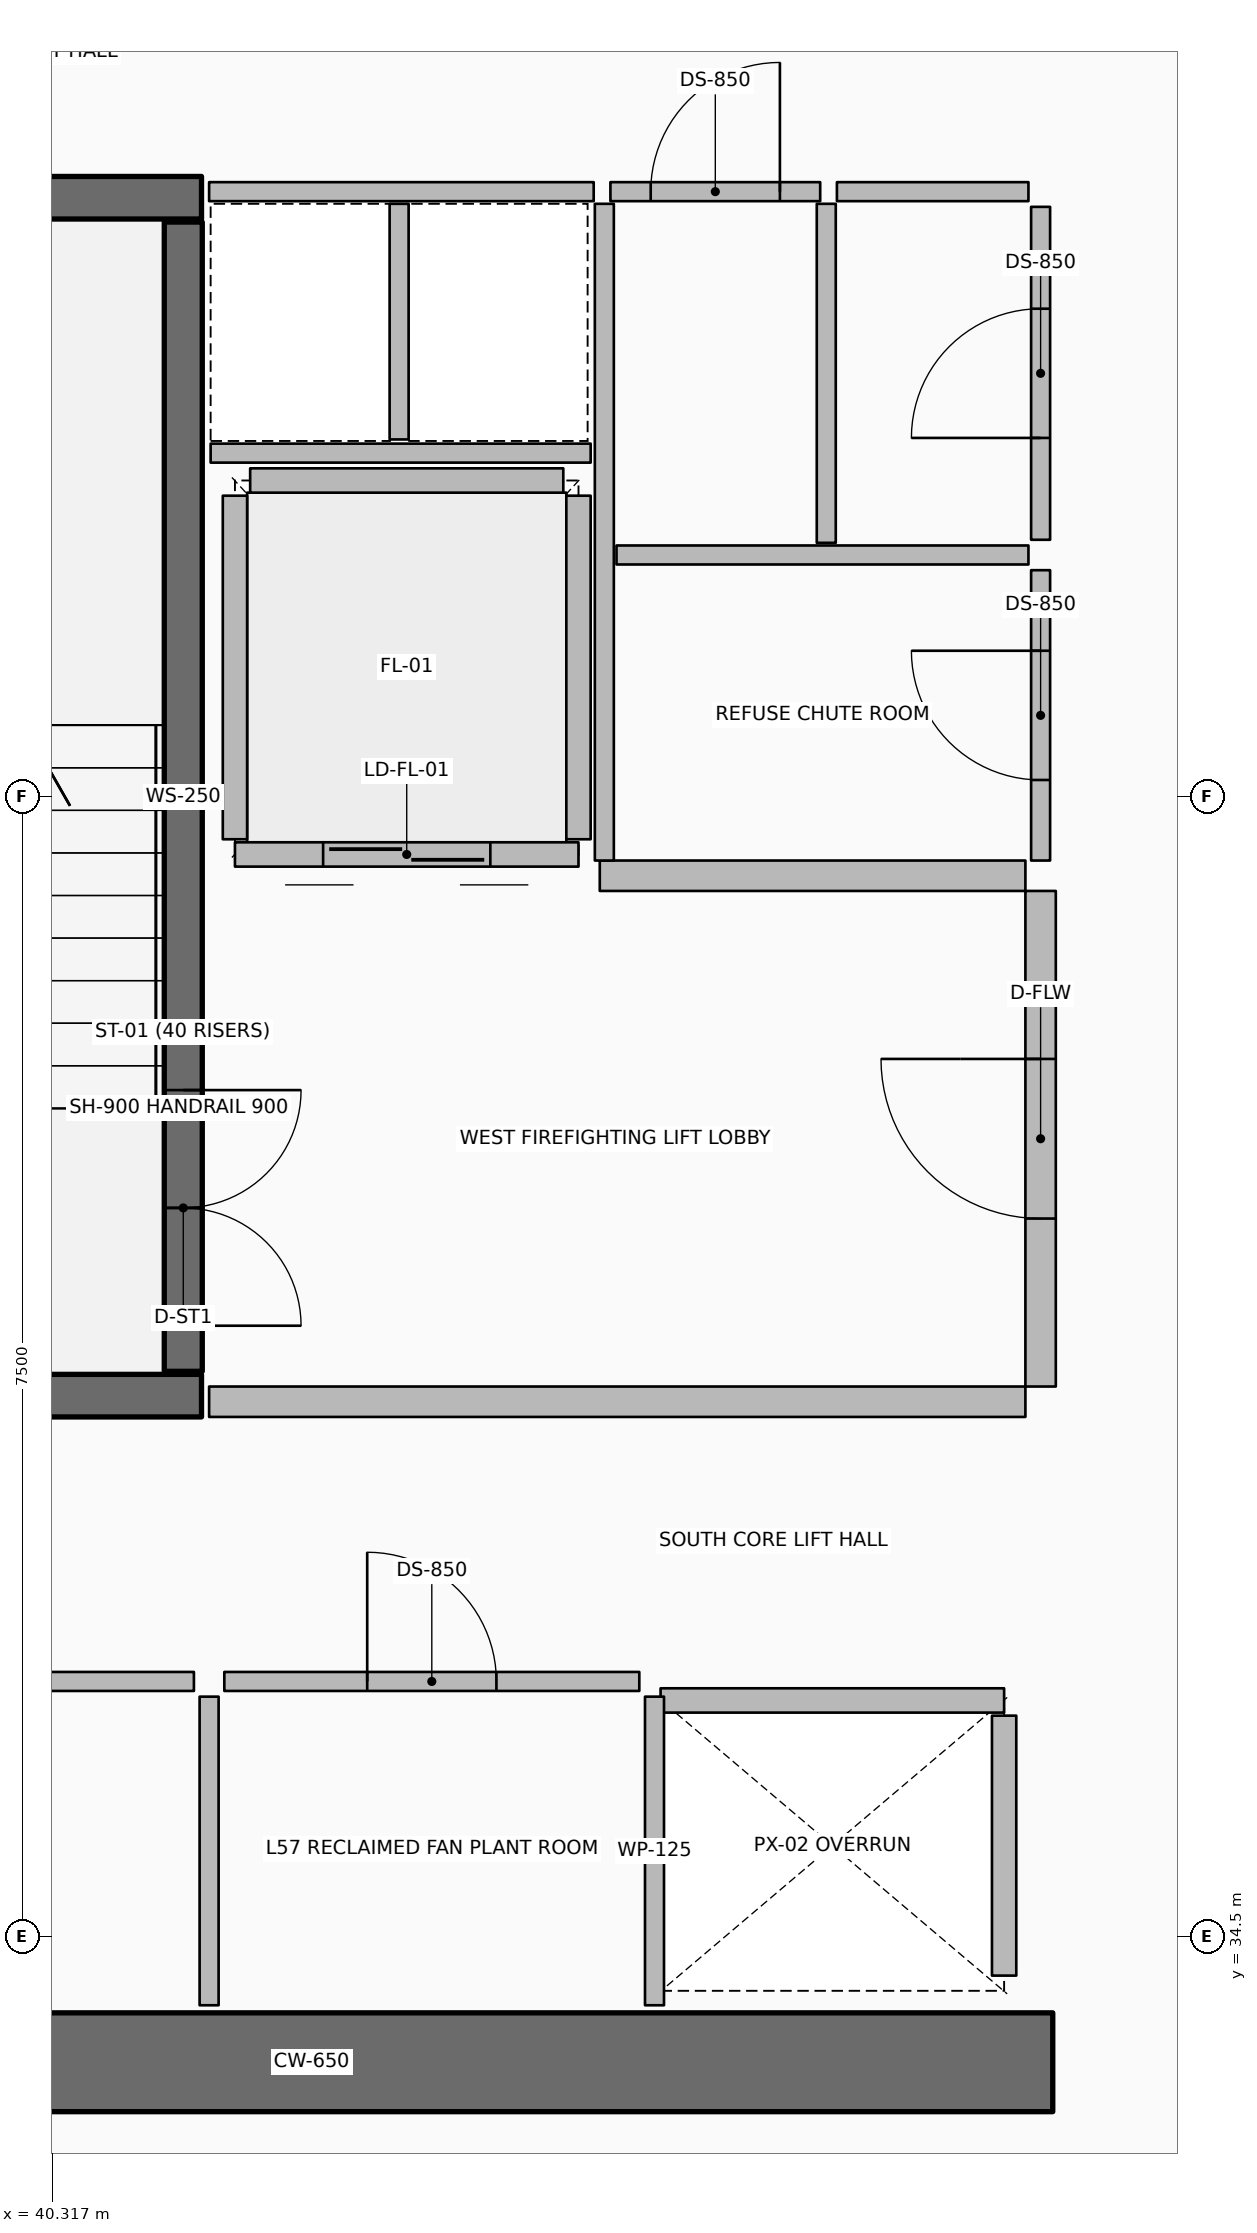
"""IFC4 building model, lengths in metres.
Left out: names, types, materials, properties, quantities, classifications, styles, units other than length and angle.
Written with IfcOpenShell. Run it as: python <this file> out.ifc"""

import sys

from ifc_helpers import new_model, si_unit, direction, frame, frame_2d, origin, origin_2d, place, context, subcontext, project, spatial, rectangle, hollow_rectangle, extrude, element, fill, save


model = new_model("IFC4")
c1 = context("Model", 3, precision=1e-05, world=origin(), true_north=direction((0.0, 1.0)))
c2 = subcontext(c1, "Body", "Model", "MODEL_VIEW")
j1 = project(units=[si_unit("LENGTHUNIT", "METRE"), si_unit("PLANEANGLEUNIT", "RADIAN")], contexts=[c1])
p1 = place(None, origin())
s1 = spatial("IfcSite", under=j1, at=p1, CompositionType="ELEMENT")
p2 = place(p1, origin())
s2 = spatial("IfcBuilding", under=s1, at=p2, CompositionType="ELEMENT")
p3 = place(p2, frame((0.0, 0.0, 225.3)))
s3 = spatial("IfcBuildingStorey", under=s2, at=p3, CompositionType="ELEMENT", Elevation=225.3)
p4 = place(p3, frame((37.15, 33.675, 0.0), z_axis=(0.0, 0.0, 1.0), x_axis=(1.0, 0.0, 0.0)))
e1 = element("IfcWall", 1, at=p4, inside=s3, PredefinedType="SHEAR", context=c2, shape_type="SweptSolid", body=[
    extrude(rectangle(XDim=9.75, YDim=0.65, at=frame_2d((4.875, 0.0))), origin(), (0.0, 0.0, 1.0), 6.6),
])
for number, where, z_axis, x_axis in (
    (2, (37.8, 38.06, 0.0), (0.0, 0.0, 1.0), (1.0, 0.0, 0.0)),
    (3, (37.8, 45.94, 0.0), (0.0, 0.0, 1.0), (1.0, 0.0, 0.0)),
):
    element("IfcWall", number, at=place(p3, frame(where, z_axis=z_axis, x_axis=x_axis)), inside=s3, PredefinedType="SHEAR", context=c2, shape_type="SweptSolid", body=[
        extrude(rectangle(XDim=3.5, YDim=0.28, at=frame_2d((1.75, 0.0))), origin(), (0.0, 0.0, 1.0), 6.6),
    ])
p5 = place(p3, frame((41.18, 42.47, 0.0), z_axis=(0.0, 0.0, 1.0), x_axis=(1.0, 0.0, 0.0)))
e4 = element("IfcColumn", 4, at=p5, inside=s3, PredefinedType="COLUMN", context=c2, shape_type="SweptSolid", body=[
    extrude(hollow_rectangle(XDim=0.2, YDim=0.2, WallThickness=0.01, InnerFilletRadius=0.01, OuterFilletRadius=0.02, at=origin_2d()), origin(), (0.0, 0.0, 1.0), 1.445),
])
p6 = place(p3, frame((41.18, 43.17, 0.0), z_axis=(0.0, 0.0, 1.0), x_axis=(1.0, 0.0, 0.0)))
e5 = element("IfcColumn", 5, at=p6, inside=s3, PredefinedType="COLUMN", context=c2, shape_type="SweptSolid", body=[
    extrude(hollow_rectangle(XDim=0.2, YDim=0.2, WallThickness=0.01, InnerFilletRadius=0.01, OuterFilletRadius=0.02, at=origin_2d()), origin(), (0.0, 0.0, 1.0), 4.745),
])
p7 = place(p3, frame((41.18, 38.22, 0.0), z_axis=(0.0, 0.0, 1.0), x_axis=(0.0, 1.0, 0.0)))
e6 = element("IfcWall", 6, at=p7, inside=s3, PredefinedType="SOLIDWALL", context=c2, shape_type="SweptSolid", body=[
    extrude(rectangle(XDim=7.56, YDim=0.25, at=frame_2d((3.78, 0.0))), origin(), (0.0, 0.0, 1.0), 6.28),
])
p8 = place(p7, frame((0.3, 0.0, 0.0)))
e7 = element("IfcOpeningElement", 7, at=p8, cuts=e6, PredefinedType="OPENING", context=c2, shape_type="SweptSolid", body=[
    extrude(rectangle(XDim=1.55, YDim=2.15, at=frame_2d((0.775, 1.075))), frame((0.0, 0.135, 0.0), z_axis=(0.0, -1.0, 0.0), x_axis=(1.0, 0.0, 0.0)), (0.0, 0.0, 1.0), 0.27),
])
p9 = place(p3, frame((44.32, 36.055, 0.0), z_axis=(0.0, 0.0, 1.0), x_axis=(1.0, 0.0, 0.0)))
e8 = element("IfcWall", 8, at=p9, inside=s3, PredefinedType="PARTITIONING", context=c2, shape_type="SweptSolid", body=[
    extrude(rectangle(XDim=2.26, YDim=0.16, at=frame_2d((1.13, 0.0))), origin(), (0.0, 0.0, 1.0), 6.28),
])
p10 = place(p3, frame((46.58, 34.245, 0.0), z_axis=(0.0, 0.0, 1.0), x_axis=(0.0, 1.0, 0.0)))
e9 = element("IfcWall", 9, at=p10, inside=s3, PredefinedType="PARTITIONING", context=c2, shape_type="SweptSolid", body=[
    extrude(rectangle(XDim=1.71, YDim=0.16, at=frame_2d((0.855, 0.0))), origin(), (0.0, 0.0, 1.0), 6.28),
])
p11 = place(p3, frame((43.78, 41.62, 0.0), z_axis=(0.0, 0.0, 1.0), x_axis=(-1.0, 0.0, 0.0)))
e10 = element("IfcWall", 10, at=p11, inside=s3, PredefinedType="PARTITIONING", context=c2, shape_type="SweptSolid", body=[
    extrude(rectangle(XDim=2.26, YDim=0.16, at=frame_2d((1.13, 0.0))), origin(), (0.0, 0.0, 1.0), 6.28),
])
p12 = place(p11, frame((0.58, 0.0, 0.0)))
e11 = element("IfcOpeningElement", 11, at=p12, cuts=e10, PredefinedType="OPENING", context=c2, shape_type="SweptSolid", body=[
    extrude(rectangle(XDim=1.1, YDim=2.1, at=frame_2d((0.55, 1.05))), frame((0.0, 0.09, 0.0), z_axis=(0.0, -1.0, 0.0), x_axis=(1.0, 0.0, 0.0)), (0.0, 0.0, 1.0), 0.18),
])
for number, where, z_axis, x_axis in (
    (12, (43.78, 41.72, 0.0), (0.0, 0.0, 1.0), (0.0, 1.0, 0.0)),
    (13, (41.52, 41.72, 0.0), (0.0, 0.0, 1.0), (0.0, 1.0, 0.0)),
):
    element("IfcWall", number, at=place(p3, frame(where, z_axis=z_axis, x_axis=x_axis)), inside=s3, PredefinedType="PARTITIONING", context=c2, shape_type="SweptSolid", body=[
        extrude(rectangle(XDim=2.26, YDim=0.16, at=frame_2d((1.13, 0.0))), origin(), (0.0, 0.0, 1.0), 6.28),
    ])
p13 = place(p3, frame((41.62, 44.08, 0.0), z_axis=(0.0, 0.0, 1.0), x_axis=(1.0, 0.0, 0.0)))
e14 = element("IfcWall", 14, at=p13, inside=s3, PredefinedType="PARTITIONING", context=c2, shape_type="SweptSolid", body=[
    extrude(rectangle(XDim=2.06, YDim=0.16, at=frame_2d((1.03, 0.0))), origin(), (0.0, 0.0, 1.0), 6.28),
])
for number, where, z_axis, x_axis in (
    (15, (44.28, 34.05, 0.0), (0.0, 0.0, 1.0), (0.0, 1.0, 0.0)),
    (16, (41.35, 34.05, 0.0), (0.0, 0.0, 1.0), (0.0, 1.0, 0.0)),
):
    element("IfcWall", number, at=place(p3, frame(where, z_axis=z_axis, x_axis=x_axis)), inside=s3, PredefinedType="PARTITIONING", context=c2, shape_type="SweptSolid", body=[
        extrude(rectangle(XDim=2.03, YDim=0.125, at=frame_2d((1.015, 0.0))), origin(), (0.0, 0.0, 1.0), 5.72),
    ])
p14 = place(p3, frame((37.92, 36.18, 0.0), z_axis=(0.0, 0.0, 1.0), x_axis=(1.0, 0.0, 0.0)))
e17 = element("IfcWall", 17, at=p14, inside=s3, PredefinedType="PARTITIONING", context=c2, shape_type="SweptSolid", body=[
    extrude(rectangle(XDim=3.33, YDim=0.125, at=frame_2d((1.665, 0.0))), origin(), (0.0, 0.0, 1.0), 5.72),
])
p15 = place(p14, frame((1.24, 0.0, 0.0)))
e18 = element("IfcOpeningElement", 18, at=p15, cuts=e17, PredefinedType="OPENING", context=c2, shape_type="SweptSolid", body=[
    extrude(rectangle(XDim=0.85, YDim=2.06, at=frame_2d((0.425, 1.03))), frame((0.0, 0.073, 0.0), z_axis=(0.0, -1.0, 0.0), x_axis=(1.0, 0.0, 0.0)), (0.0, 0.0, 1.0), 0.145),
])
p16 = place(p3, frame((41.45, 36.18, 0.0), z_axis=(0.0, 0.0, 1.0), x_axis=(1.0, 0.0, 0.0)))
e19 = element("IfcWall", 19, at=p16, inside=s3, PredefinedType="PARTITIONING", context=c2, shape_type="SweptSolid", body=[
    extrude(rectangle(XDim=2.73, YDim=0.125, at=frame_2d((1.365, 0.0))), origin(), (0.0, 0.0, 1.0), 5.72),
])
p17 = place(p16, frame((0.94, 0.0, 0.0)))
e20 = element("IfcOpeningElement", 20, at=p17, cuts=e19, PredefinedType="OPENING", context=c2, shape_type="SweptSolid", body=[
    extrude(rectangle(XDim=0.85, YDim=2.06, at=frame_2d((0.425, 1.03))), frame((0.0, 0.073, 0.0), z_axis=(0.0, -1.0, 0.0), x_axis=(1.0, 0.0, 0.0)), (0.0, 0.0, 1.0), 0.145),
])
p18 = place(p3, frame((41.35, 38.02, 0.0), z_axis=(0.0, 0.0, 1.0), x_axis=(1.0, 0.0, 0.0)))
e21 = element("IfcWall", 21, at=p18, inside=s3, PredefinedType="PARTITIONING", context=c2, shape_type="SweptSolid", body=[
    extrude(rectangle(XDim=5.37, YDim=0.2, at=frame_2d((2.685, 0.0))), origin(), (0.0, 0.0, 1.0), 6.28),
])
p19 = place(p3, frame((43.92, 41.48, 0.0), z_axis=(0.0, 0.0, 1.0), x_axis=(1.0, 0.0, 0.0)))
e22 = element("IfcWall", 22, at=p19, inside=s3, PredefinedType="PARTITIONING", context=c2, shape_type="SweptSolid", body=[
    extrude(rectangle(XDim=2.8, YDim=0.2, at=frame_2d((1.4, 0.0))), origin(), (0.0, 0.0, 1.0), 6.28),
])
p20 = place(p3, frame((46.82, 38.12, 0.0), z_axis=(0.0, 0.0, 1.0), x_axis=(0.0, 1.0, 0.0)))
e23 = element("IfcWall", 23, at=p20, inside=s3, PredefinedType="PARTITIONING", context=c2, shape_type="SweptSolid", body=[
    extrude(rectangle(XDim=3.26, YDim=0.2, at=frame_2d((1.63, 0.0))), origin(), (0.0, 0.0, 1.0), 6.28),
])
p21 = place(p20, frame((1.105, 0.0, 0.0)))
e24 = element("IfcOpeningElement", 24, at=p21, cuts=e23, PredefinedType="OPENING", context=c2, shape_type="SweptSolid", body=[
    extrude(rectangle(XDim=1.05, YDim=2.1, at=frame_2d((0.525, 1.05))), frame((0.0, 0.11, 0.0), z_axis=(0.0, -1.0, 0.0), x_axis=(1.0, 0.0, 0.0)), (0.0, 0.0, 1.0), 0.22),
])
p22 = place(p3, frame((41.36, 44.26, 0.0), z_axis=(0.0, 0.0, 1.0), x_axis=(1.0, 0.0, 0.0)))
e25 = element("IfcWall", 25, at=p22, inside=s3, PredefinedType="PARTITIONING", context=c2, shape_type="SweptSolid", body=[
    extrude(rectangle(XDim=2.5, YDim=0.125, at=frame_2d((1.25, 0.0))), origin(), (0.0, 0.0, 1.0), 5.72),
])
p23 = place(p3, frame((42.6, 44.35, 0.0), z_axis=(0.0, 0.0, 1.0), x_axis=(0.0, 1.0, 0.0)))
e26 = element("IfcWall", 26, at=p23, inside=s3, PredefinedType="PARTITIONING", context=c2, shape_type="SweptSolid", body=[
    extrude(rectangle(XDim=1.55, YDim=0.125, at=frame_2d((0.775, 0.0))), origin(), (0.0, 0.0, 1.0), 5.72),
])
p24 = place(p3, frame((43.95, 41.58, 0.0), z_axis=(0.0, 0.0, 1.0), x_axis=(0.0, 1.0, 0.0)))
e27 = element("IfcWall", 27, at=p24, inside=s3, PredefinedType="PARTITIONING", context=c2, shape_type="SweptSolid", body=[
    extrude(rectangle(XDim=4.32, YDim=0.125, at=frame_2d((2.16, 0.0))), origin(), (0.0, 0.0, 1.0), 5.72),
])
p25 = place(p3, frame((44.03, 43.59, 0.0), z_axis=(0.0, 0.0, 1.0), x_axis=(1.0, 0.0, 0.0)))
e28 = element("IfcWall", 28, at=p25, inside=s3, PredefinedType="PARTITIONING", context=c2, shape_type="SweptSolid", body=[
    extrude(rectangle(XDim=2.71, YDim=0.125, at=frame_2d((1.355, 0.0))), origin(), (0.0, 0.0, 1.0), 5.72),
])
p26 = place(p3, frame((45.41, 43.67, 0.0), z_axis=(0.0, 0.0, 1.0), x_axis=(0.0, 1.0, 0.0)))
e29 = element("IfcWall", 29, at=p26, inside=s3, PredefinedType="PARTITIONING", context=c2, shape_type="SweptSolid", body=[
    extrude(rectangle(XDim=2.23, YDim=0.125, at=frame_2d((1.115, 0.0))), origin(), (0.0, 0.0, 1.0), 5.72),
])
p27 = place(p3, frame((46.82, 41.58, 0.0), z_axis=(0.0, 0.0, 1.0), x_axis=(0.0, 1.0, 0.0)))
e30 = element("IfcWall", 30, at=p27, inside=s3, PredefinedType="PARTITIONING", context=c2, shape_type="SweptSolid", body=[
    extrude(rectangle(XDim=1.91, YDim=0.125, at=frame_2d((0.955, 0.0))), origin(), (0.0, 0.0, 1.0), 5.72),
])
p28 = place(p27, frame((0.53, 0.0, 0.0)))
e31 = element("IfcOpeningElement", 31, at=p28, cuts=e30, PredefinedType="OPENING", context=c2, shape_type="SweptSolid", body=[
    extrude(rectangle(XDim=0.85, YDim=2.06, at=frame_2d((0.425, 1.03))), frame((0.0, 0.073, 0.0), z_axis=(0.0, -1.0, 0.0), x_axis=(1.0, 0.0, 0.0)), (0.0, 0.0, 1.0), 0.145),
])
p29 = place(p3, frame((46.82, 43.69, 0.0), z_axis=(0.0, 0.0, 1.0), x_axis=(0.0, 1.0, 0.0)))
e32 = element("IfcWall", 32, at=p29, inside=s3, PredefinedType="PARTITIONING", context=c2, shape_type="SweptSolid", body=[
    extrude(rectangle(XDim=2.19, YDim=0.125, at=frame_2d((1.095, 0.0))), origin(), (0.0, 0.0, 1.0), 5.72),
])
p30 = place(p29, frame((0.67, 0.0, 0.0)))
e33 = element("IfcOpeningElement", 33, at=p30, cuts=e32, PredefinedType="OPENING", context=c2, shape_type="SweptSolid", body=[
    extrude(rectangle(XDim=0.85, YDim=2.06, at=frame_2d((0.425, 1.03))), frame((0.0, 0.073, 0.0), z_axis=(0.0, -1.0, 0.0), x_axis=(1.0, 0.0, 0.0)), (0.0, 0.0, 1.0), 0.145),
])
p31 = place(p3, frame((41.35, 45.98, 0.0), z_axis=(0.0, 0.0, 1.0), x_axis=(1.0, 0.0, 0.0)))
e34 = element("IfcWall", 34, at=p31, inside=s3, PredefinedType="PARTITIONING", context=c2, shape_type="SweptSolid", body=[
    extrude(rectangle(XDim=2.53, YDim=0.125, at=frame_2d((1.265, 0.0))), origin(), (0.0, 0.0, 1.0), 5.72),
])
p32 = place(p3, frame((43.99, 45.98, 0.0), z_axis=(0.0, 0.0, 1.0), x_axis=(1.0, 0.0, 0.0)))
e35 = element("IfcWall", 35, at=p32, inside=s3, PredefinedType="PARTITIONING", context=c2, shape_type="SweptSolid", body=[
    extrude(rectangle(XDim=1.38, YDim=0.125, at=frame_2d((0.69, 0.0))), origin(), (0.0, 0.0, 1.0), 5.72),
])
p33 = place(p32, frame((0.265, 0.0, 0.0)))
e36 = element("IfcOpeningElement", 36, at=p33, cuts=e35, PredefinedType="OPENING", context=c2, shape_type="SweptSolid", body=[
    extrude(rectangle(XDim=0.85, YDim=2.06, at=frame_2d((0.425, 1.03))), frame((0.0, 0.073, 0.0), z_axis=(0.0, -1.0, 0.0), x_axis=(1.0, 0.0, 0.0)), (0.0, 0.0, 1.0), 0.145),
])
p34 = place(p3, frame((45.48, 45.98, 0.0), z_axis=(0.0, 0.0, 1.0), x_axis=(1.0, 0.0, 0.0)))
e37 = element("IfcWall", 37, at=p34, inside=s3, PredefinedType="PARTITIONING", context=c2, shape_type="SweptSolid", body=[
    extrude(rectangle(XDim=1.26, YDim=0.125, at=frame_2d((0.63, 0.0))), origin(), (0.0, 0.0, 1.0), 5.72),
])
p35 = place(p8, origin())
e38 = element("IfcDoor", 38, at=p35, inside=s3, OperationType="DOUBLE_DOOR_SINGLE_SWING", PredefinedType="DOOR", context=c2, shape_type="SweptSolid", body=[
    extrude(rectangle(XDim=1.55, YDim=2.15, at=frame_2d((0.775, 1.075))), frame((0.0, 0.025, 0.0), z_axis=(0.0, -1.0, 0.0), x_axis=(1.0, 0.0, 0.0)), (0.0, 0.0, 1.0), 0.05),
])
fill(e7, e38)
p36 = place(p12, origin())
e39 = element("IfcDoor", 39, at=p36, inside=s3, OperationType="DOUBLE_DOOR_SLIDING", PredefinedType="DOOR", context=c2, shape_type="SweptSolid", body=[
    extrude(rectangle(XDim=1.1, YDim=2.1, at=frame_2d((0.55, 1.05))), frame((0.0, 0.025, 0.0), z_axis=(0.0, -1.0, 0.0), x_axis=(1.0, 0.0, 0.0)), (0.0, 0.0, 1.0), 0.05),
])
fill(e11, e39)
p37 = place(p17, origin())
e40 = element("IfcDoor", 40, at=p37, inside=s3, OperationType="SINGLE_SWING_LEFT", PredefinedType="DOOR", context=c2, shape_type="SweptSolid", body=[
    extrude(rectangle(XDim=0.85, YDim=2.06, at=frame_2d((0.425, 1.03))), frame((0.0, 0.025, 0.0), z_axis=(0.0, -1.0, 0.0), x_axis=(1.0, 0.0, 0.0)), (0.0, 0.0, 1.0), 0.05),
])
fill(e20, e40)
p38 = place(p21, origin())
e41 = element("IfcDoor", 41, at=p38, inside=s3, OperationType="SINGLE_SWING_RIGHT", PredefinedType="DOOR", context=c2, shape_type="SweptSolid", body=[
    extrude(rectangle(XDim=1.05, YDim=2.1, at=frame_2d((0.525, 1.05))), frame((0.0, 0.025, 0.0), z_axis=(0.0, -1.0, 0.0), x_axis=(1.0, 0.0, 0.0)), (0.0, 0.0, 1.0), 0.05),
])
fill(e24, e41)
p39 = place(p28, origin())
e42 = element("IfcDoor", 42, at=p39, inside=s3, OperationType="SINGLE_SWING_RIGHT", PredefinedType="DOOR", context=c2, shape_type="SweptSolid", body=[
    extrude(rectangle(XDim=0.85, YDim=2.06, at=frame_2d((0.425, 1.03))), frame((0.0, 0.025, 0.0), z_axis=(0.0, -1.0, 0.0), x_axis=(1.0, 0.0, 0.0)), (0.0, 0.0, 1.0), 0.05),
])
fill(e31, e42)
p40 = place(p30, origin())
e43 = element("IfcDoor", 43, at=p40, inside=s3, OperationType="SINGLE_SWING_LEFT", PredefinedType="DOOR", context=c2, shape_type="SweptSolid", body=[
    extrude(rectangle(XDim=0.85, YDim=2.06, at=frame_2d((0.425, 1.03))), frame((0.0, 0.025, 0.0), z_axis=(0.0, -1.0, 0.0), x_axis=(1.0, 0.0, 0.0)), (0.0, 0.0, 1.0), 0.05),
])
fill(e33, e43)
p41 = place(p33, origin())
e44 = element("IfcDoor", 44, at=p41, inside=s3, OperationType="SINGLE_SWING_RIGHT", PredefinedType="DOOR", context=c2, shape_type="SweptSolid", body=[
    extrude(rectangle(XDim=0.85, YDim=2.06, at=frame_2d((0.425, 1.03))), frame((0.0, 0.025, 0.0), z_axis=(0.0, -1.0, 0.0), x_axis=(1.0, 0.0, 0.0)), (0.0, 0.0, 1.0), 0.05),
])
fill(e36, e44)
save(model, sys.argv[1])
